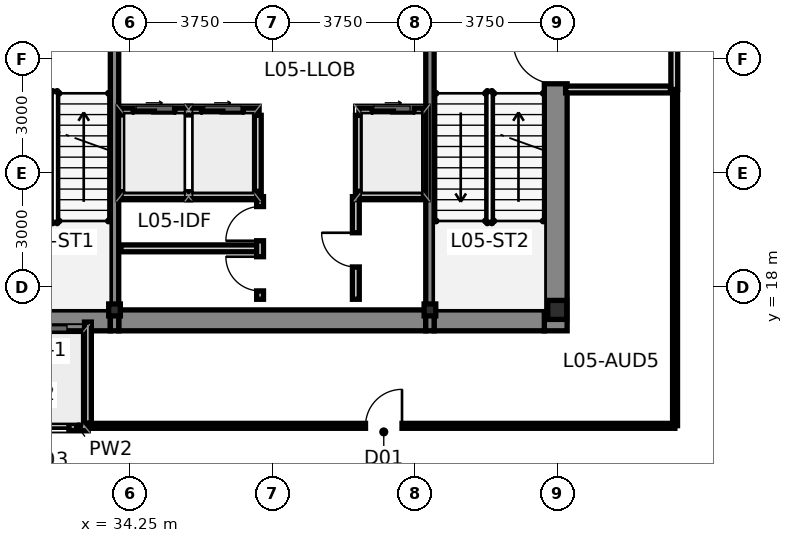
"""IFC4 building model, lengths in metres.
Left out: names, types, materials, properties, quantities, classifications, styles, units other than length and angle.
Written with IfcOpenShell. Run it as: python <this file> out.ifc"""

import sys

from ifc_helpers import new_model, si_unit, direction, frame, frame_2d, origin, origin_2d, place, context, subcontext, project, spatial, rectangle, i_section, extrude, source, transform, mapped, element, fill, save


model = new_model("IFC4")
c1 = context("Model", 3, precision=1e-05, world=origin(), true_north=direction((0.0, 1.0)))
c2 = subcontext(c1, "Body", "Model", "MODEL_VIEW")
j1 = project(units=[si_unit("LENGTHUNIT", "METRE"), si_unit("PLANEANGLEUNIT", "RADIAN")], contexts=[c1])
p1 = place(None, origin())
s1 = spatial("IfcSite", under=j1, at=p1, CompositionType="ELEMENT")
p2 = place(p1, origin())
s2 = spatial("IfcBuilding", under=s1, at=p2, CompositionType="ELEMENT")
p3 = place(p2, frame((0.0, 0.0, 23.1)))
s3 = spatial("IfcBuildingStorey", under=s2, at=p3, CompositionType="ELEMENT", Elevation=23.1)
m1 = source(origin(), c2, "Body", "SweptSolid", [
    extrude(i_section(OverallWidth=0.5, OverallDepth=0.5, WebThickness=0.028, FlangeThickness=0.04, at=origin_2d()), origin(), (0.0, 0.0, 1.0), 4.5),
])
p4 = place(p3, frame((45.5, 17.4, 0.0), z_axis=(0.0, 0.0, 1.0), x_axis=(1.0, 0.0, 0.0)))
e1 = element("IfcColumn", 1, at=p4, inside=s3, PredefinedType="COLUMN", context=c2, shape_type="MappedRepresentation", body=[
    mapped(m1, transform((0.0, 0.0, 0.0), scale=1.0)),
])
m2 = source(origin(), c2, "Body", "SweptSolid", [
    extrude(i_section(OverallWidth=0.307, OverallDepth=0.315, WebThickness=0.012, FlangeThickness=0.019, at=origin_2d()), origin(), (0.0, 0.0, 1.0), 4.5),
])
for number, where, z_axis, x_axis in (
    (2, (33.85, 17.4, 0.0), (0.0, 0.0, 1.0), (1.0, 0.0, 0.0)),
    (3, (42.15, 17.4, 0.0), (0.0, 0.0, 1.0), (1.0, 0.0, 0.0)),
):
    element("IfcColumn", number, at=place(p3, frame(where, z_axis=z_axis, x_axis=x_axis)), inside=s3, PredefinedType="COLUMN", context=c2, shape_type="MappedRepresentation", body=[
        mapped(m2, transform((0.0, 0.0, 0.0), scale=1.0)),
    ])
p5 = place(p3, frame((45.46, 16.85, 0.0), z_axis=(0.0, 0.0, 1.0), x_axis=(0.0, 1.0, 0.0)))
e4 = element("IfcWall", 4, at=p5, inside=s3, PredefinedType="SHEAR", context=c2, shape_type="SweptSolid", body=[
    extrude(rectangle(XDim=13.425, YDim=0.6, at=frame_2d((6.712, 0.0))), origin(), (0.0, 0.0, 1.0), 4.5),
])
p6 = place(p5, frame((6.5, 0.0, 0.0)))
e5 = element("IfcOpeningElement", 5, at=p6, cuts=e4, PredefinedType="OPENING", context=c2, shape_type="SweptSolid", body=[
    extrude(rectangle(XDim=1.12, YDim=2.15, at=frame_2d((0.56, 1.075))), frame((0.0, 0.312, 0.0), z_axis=(0.0, -1.0, 0.0), x_axis=(1.0, 0.0, 0.0)), (0.0, 0.0, 1.0), 0.624),
])
p7 = place(p5, frame((10.95, 0.0, 0.0)))
e6 = element("IfcOpeningElement", 6, at=p7, cuts=e4, PredefinedType="OPENING", context=c2, shape_type="SweptSolid", body=[
    extrude(rectangle(XDim=1.2, YDim=2.2, at=frame_2d((0.6, 1.1))), frame((0.0, 0.312, 0.0), z_axis=(0.0, -1.0, 0.0), x_axis=(1.0, 0.0, 0.0)), (0.0, 0.0, 1.0), 0.624),
])
p8 = place(p3, frame((30.84, 17.125, 0.0), z_axis=(0.0, 0.0, 1.0), x_axis=(1.0, 0.0, 0.0)))
e7 = element("IfcWall", 7, at=p8, inside=s3, PredefinedType="SHEAR", context=c2, shape_type="SweptSolid", body=[
    extrude(rectangle(XDim=2.9, YDim=0.55, at=frame_2d((1.45, 0.0))), origin(), (0.0, 0.0, 1.0), 4.5),
])
p9 = place(p3, frame((33.96, 17.125, 0.0), z_axis=(0.0, 0.0, 1.0), x_axis=(1.0, 0.0, 0.0)))
e8 = element("IfcWall", 8, at=p9, inside=s3, PredefinedType="SHEAR", context=c2, shape_type="SweptSolid", body=[
    extrude(rectangle(XDim=8.08, YDim=0.55, at=frame_2d((4.04, 0.0))), origin(), (0.0, 0.0, 1.0), 4.5),
])
p10 = place(p3, frame((42.26, 17.125, 0.0), z_axis=(0.0, 0.0, 1.0), x_axis=(1.0, 0.0, 0.0)))
e9 = element("IfcWall", 9, at=p10, inside=s3, PredefinedType="SHEAR", context=c2, shape_type="SweptSolid", body=[
    extrude(rectangle(XDim=2.9, YDim=0.55, at=frame_2d((1.45, 0.0))), origin(), (0.0, 0.0, 1.0), 4.5),
])
for number, where, z_axis, x_axis in (
    (10, (33.85, 16.85, 0.0), (0.0, 0.0, 1.0), (0.0, 1.0, 0.0)),
    (11, (42.15, 16.85, 0.0), (0.0, 0.0, 1.0), (0.0, 1.0, 0.0)),
):
    element("IfcWall", number, at=place(p3, frame(where, z_axis=z_axis, x_axis=x_axis)), inside=s3, PredefinedType="SHEAR", context=c2, shape_type="SweptSolid", body=[
        extrude(rectangle(XDim=13.425, YDim=0.22, at=frame_2d((6.712, 0.0))), origin(), (0.0, 0.0, 1.0), 4.5),
    ])
p11 = place(p3, frame((30.85, 14.32, 0.0), z_axis=(0.0, 0.0, 1.0), x_axis=(1.0, 0.0, 0.0)))
e12 = element("IfcWall", 12, at=p11, inside=s3, PredefinedType="PARTITIONING", context=c2, shape_type="SweptSolid", body=[
    extrude(rectangle(XDim=2.3, YDim=0.18, at=frame_2d((1.15, 0.0))), origin(), (0.0, 0.0, 1.0), 4.25),
])
p12 = place(p11, frame((0.45, 0.0, 0.0)))
e13 = element("IfcOpeningElement", 13, at=p12, cuts=e12, PredefinedType="OPENING", context=c2, shape_type="SweptSolid", body=[
    extrude(rectangle(XDim=1.35, YDim=2.25, at=frame_2d((0.675, 1.125))), frame((0.0, 0.102, 0.0), z_axis=(0.0, -1.0, 0.0), x_axis=(1.0, 0.0, 0.0)), (0.0, 0.0, 1.0), 0.204),
])
p13 = place(p3, frame((33.15, 14.42, 0.0), z_axis=(0.0, 0.0, 1.0), x_axis=(0.0, 1.0, 0.0)))
e14 = element("IfcWall", 14, at=p13, inside=s3, PredefinedType="PARTITIONING", context=c2, shape_type="SweptSolid", body=[
    extrude(rectangle(XDim=2.66, YDim=0.18, at=frame_2d((1.33, 0.0))), origin(), (0.0, 0.0, 1.0), 4.25),
])
p14 = place(p3, frame((34.02, 22.62, 0.0), z_axis=(0.0, 0.0, 1.0), x_axis=(1.0, 0.0, 0.0)))
e15 = element("IfcWall", 15, at=p14, inside=s3, PredefinedType="PARTITIONING", context=c2, shape_type="SweptSolid", body=[
    extrude(rectangle(XDim=3.6, YDim=0.18, at=frame_2d((1.8, 0.0))), origin(), (0.0, 0.0, 1.0), 4.25),
])
p15 = place(p14, frame((0.32, 0.0, 0.0)))
e16 = element("IfcOpeningElement", 16, at=p15, cuts=e15, PredefinedType="OPENING", context=c2, shape_type="SweptSolid", body=[
    extrude(rectangle(XDim=1.1, YDim=2.2, at=frame_2d((0.55, 1.1))), frame((0.0, 0.102, 0.0), z_axis=(0.0, -1.0, 0.0), x_axis=(1.0, 0.0, 0.0)), (0.0, 0.0, 1.0), 0.204),
])
p16 = place(p14, frame((2.12, 0.0, 0.0)))
e17 = element("IfcOpeningElement", 17, at=p16, cuts=e15, PredefinedType="OPENING", context=c2, shape_type="SweptSolid", body=[
    extrude(rectangle(XDim=1.1, YDim=2.2, at=frame_2d((0.55, 1.1))), frame((0.0, 0.102, 0.0), z_axis=(0.0, -1.0, 0.0), x_axis=(1.0, 0.0, 0.0)), (0.0, 0.0, 1.0), 0.204),
])
p17 = place(p3, frame((40.28, 22.62, 0.0), z_axis=(0.0, 0.0, 1.0), x_axis=(1.0, 0.0, 0.0)))
e18 = element("IfcWall", 18, at=p17, inside=s3, PredefinedType="PARTITIONING", context=c2, shape_type="SweptSolid", body=[
    extrude(rectangle(XDim=1.7, YDim=0.18, at=frame_2d((0.85, 0.0))), origin(), (0.0, 0.0, 1.0), 4.25),
])
p18 = place(p17, frame((0.35, 0.0, 0.0)))
e19 = element("IfcOpeningElement", 19, at=p18, cuts=e18, PredefinedType="OPENING", context=c2, shape_type="SweptSolid", body=[
    extrude(rectangle(XDim=1.1, YDim=2.2, at=frame_2d((0.55, 1.1))), frame((0.0, 0.102, 0.0), z_axis=(0.0, -1.0, 0.0), x_axis=(1.0, 0.0, 0.0)), (0.0, 0.0, 1.0), 0.204),
])
for number, where, z_axis, x_axis in (
    (20, (37.62, 20.52, 0.0), (0.0, 0.0, 1.0), (0.0, 1.0, 0.0)),
    (21, (40.28, 20.52, 0.0), (0.0, 0.0, 1.0), (0.0, 1.0, 0.0)),
):
    element("IfcWall", number, at=place(p3, frame(where, z_axis=z_axis, x_axis=x_axis)), inside=s3, PredefinedType="PARTITIONING", context=c2, shape_type="SweptSolid", body=[
        extrude(rectangle(XDim=2.0, YDim=0.18, at=frame_2d((1.0, 0.0))), origin(), (0.0, 0.0, 1.0), 4.25),
    ])
p19 = place(p3, frame((48.58, 23.2, 0.0), z_axis=(0.0, 0.0, 1.0), x_axis=(0.0, 1.0, 0.0)))
e22 = element("IfcWall", 22, at=p19, inside=s3, PredefinedType="PARTITIONING", context=c2, shape_type="SweptSolid", body=[
    extrude(rectangle(XDim=6.4, YDim=0.18, at=frame_2d((3.2, 0.0))), origin(), (0.0, 0.0, 1.0), 4.25),
])
p20 = place(p19, frame((2.65, 0.0, 0.0)))
e23 = element("IfcOpeningElement", 23, at=p20, cuts=e22, PredefinedType="OPENING", context=c2, shape_type="SweptSolid", body=[
    extrude(rectangle(XDim=1.05, YDim=2.15, at=frame_2d((0.525, 1.075))), frame((0.0, 0.102, 0.0), z_axis=(0.0, -1.0, 0.0), x_axis=(1.0, 0.0, 0.0)), (0.0, 0.0, 1.0), 0.204),
])
p21 = place(p3, frame((45.72, 23.2, 0.0), z_axis=(0.0, 0.0, 1.0), x_axis=(1.0, 0.0, 0.0)))
e24 = element("IfcWall", 24, at=p21, inside=s3, PredefinedType="PARTITIONING", context=c2, shape_type="SweptSolid", body=[
    extrude(rectangle(XDim=2.76, YDim=0.18, at=frame_2d((1.38, 0.0))), origin(), (0.0, 0.0, 1.0), 4.25),
])
p22 = place(p3, frame((34.02, 20.42, 0.0), z_axis=(0.0, 0.0, 1.0), x_axis=(1.0, 0.0, 0.0)))
e25 = element("IfcWall", 25, at=p22, inside=s3, PredefinedType="PARTITIONING", context=c2, shape_type="SweptSolid", body=[
    extrude(rectangle(XDim=3.64, YDim=0.18, at=frame_2d((1.82, 0.0))), origin(), (0.0, 0.0, 1.0), 4.25),
])
p23 = place(p3, frame((40.22, 20.42, 0.0), z_axis=(0.0, 0.0, 1.0), x_axis=(1.0, 0.0, 0.0)))
e26 = element("IfcWall", 26, at=p23, inside=s3, PredefinedType="PARTITIONING", context=c2, shape_type="SweptSolid", body=[
    extrude(rectangle(XDim=1.76, YDim=0.18, at=frame_2d((0.88, 0.0))), origin(), (0.0, 0.0, 1.0), 4.25),
])
p24 = place(p3, frame((34.02, 19.02, 0.0), z_axis=(0.0, 0.0, 1.0), x_axis=(1.0, 0.0, 0.0)))
e27 = element("IfcWall", 27, at=p24, inside=s3, PredefinedType="PARTITIONING", context=c2, shape_type="SweptSolid", body=[
    extrude(rectangle(XDim=3.58, YDim=0.18, at=frame_2d((1.79, 0.0))), origin(), (0.0, 0.0, 1.0), 4.25),
])
p25 = place(p3, frame((37.68, 17.68, 0.0), z_axis=(0.0, 0.0, 1.0), x_axis=(0.0, 1.0, 0.0)))
e28 = element("IfcWall", 28, at=p25, inside=s3, PredefinedType="PARTITIONING", context=c2, shape_type="SweptSolid", body=[
    extrude(rectangle(XDim=2.7, YDim=0.18, at=frame_2d((1.35, 0.0))), origin(), (0.0, 0.0, 1.0), 4.25),
])
p26 = place(p25, frame((0.22, 0.0, 0.0)))
e29 = element("IfcOpeningElement", 29, at=p26, cuts=e28, PredefinedType="OPENING", context=c2, shape_type="SweptSolid", body=[
    extrude(rectangle(XDim=0.9, YDim=2.1, at=frame_2d((0.45, 1.05))), frame((0.0, 0.102, 0.0), z_axis=(0.0, -1.0, 0.0), x_axis=(1.0, 0.0, 0.0)), (0.0, 0.0, 1.0), 0.204),
])
p27 = place(p25, frame((1.54, 0.0, 0.0)))
e30 = element("IfcOpeningElement", 30, at=p27, cuts=e28, PredefinedType="OPENING", context=c2, shape_type="SweptSolid", body=[
    extrude(rectangle(XDim=0.9, YDim=2.1, at=frame_2d((0.45, 1.05))), frame((0.0, 0.102, 0.0), z_axis=(0.0, -1.0, 0.0), x_axis=(1.0, 0.0, 0.0)), (0.0, 0.0, 1.0), 0.204),
])
p28 = place(p3, frame((40.2, 17.68, 0.0), z_axis=(0.0, 0.0, 1.0), x_axis=(0.0, 1.0, 0.0)))
e31 = element("IfcWall", 31, at=p28, inside=s3, PredefinedType="PARTITIONING", context=c2, shape_type="SweptSolid", body=[
    extrude(rectangle(XDim=2.7, YDim=0.18, at=frame_2d((1.35, 0.0))), origin(), (0.0, 0.0, 1.0), 4.25),
])
p29 = place(p28, frame((0.85, 0.0, 0.0)))
e32 = element("IfcOpeningElement", 32, at=p29, cuts=e31, PredefinedType="OPENING", context=c2, shape_type="SweptSolid", body=[
    extrude(rectangle(XDim=0.9, YDim=2.1, at=frame_2d((0.45, 1.05))), frame((0.0, 0.102, 0.0), z_axis=(0.0, -1.0, 0.0), x_axis=(1.0, 0.0, 0.0)), (0.0, 0.0, 1.0), 0.204),
])
p30 = place(p3, frame((33.275, 14.35, 0.0), z_axis=(0.0, 0.0, 1.0), x_axis=(1.0, 0.0, 0.0)))
e33 = element("IfcWall", 33, at=p30, inside=s3, PredefinedType="PARTITIONING", context=c2, shape_type="SweptSolid", body=[
    extrude(rectangle(XDim=15.32, YDim=0.13, at=frame_2d((7.66, 0.0))), origin(), (0.0, 0.0, 1.0), 4.25),
])
p31 = place(p30, frame((7.18, 0.0, 0.0)))
e34 = element("IfcOpeningElement", 34, at=p31, cuts=e33, PredefinedType="OPENING", context=c2, shape_type="SweptSolid", body=[
    extrude(rectangle(XDim=0.96, YDim=2.15, at=frame_2d((0.48, 1.075))), frame((0.0, 0.077, 0.0), z_axis=(0.0, -1.0, 0.0), x_axis=(1.0, 0.0, 0.0)), (0.0, 0.0, 1.0), 0.154),
])
p32 = place(p3, frame((48.6, 14.355, 0.0), z_axis=(0.0, 0.0, 1.0), x_axis=(0.0, 1.0, 0.0)))
e35 = element("IfcWall", 35, at=p32, inside=s3, PredefinedType="PARTITIONING", context=c2, shape_type="SweptSolid", body=[
    extrude(rectangle(XDim=8.75, YDim=0.13, at=frame_2d((4.375, 0.0))), origin(), (0.0, 0.0, 1.0), 4.25),
])
p33 = place(p6, origin())
e36 = element("IfcDoor", 36, at=p33, inside=s3, OperationType="SINGLE_SWING_RIGHT", PredefinedType="DOOR", context=c2, shape_type="SweptSolid", body=[
    extrude(rectangle(XDim=1.12, YDim=2.15, at=frame_2d((0.56, 1.075))), frame((0.0, 0.025, 0.0), z_axis=(0.0, -1.0, 0.0), x_axis=(1.0, 0.0, 0.0)), (0.0, 0.0, 1.0), 0.05),
])
fill(e5, e36)
p34 = place(p12, origin())
e37 = element("IfcDoor", 37, at=p34, inside=s3, OperationType="SLIDING_TO_LEFT", PredefinedType="DOOR", context=c2, shape_type="SweptSolid", body=[
    extrude(rectangle(XDim=1.35, YDim=2.25, at=frame_2d((0.675, 1.125))), frame((0.0, 0.025, 0.0), z_axis=(0.0, -1.0, 0.0), x_axis=(1.0, 0.0, 0.0)), (0.0, 0.0, 1.0), 0.05),
])
fill(e13, e37)
p35 = place(p15, origin())
e38 = element("IfcDoor", 38, at=p35, inside=s3, OperationType="SLIDING_TO_LEFT", PredefinedType="DOOR", context=c2, shape_type="SweptSolid", body=[
    extrude(rectangle(XDim=1.1, YDim=2.2, at=frame_2d((0.55, 1.1))), frame((0.0, 0.025, 0.0), z_axis=(0.0, -1.0, 0.0), x_axis=(1.0, 0.0, 0.0)), (0.0, 0.0, 1.0), 0.05),
])
fill(e16, e38)
p36 = place(p16, origin())
e39 = element("IfcDoor", 39, at=p36, inside=s3, OperationType="SLIDING_TO_RIGHT", PredefinedType="DOOR", context=c2, shape_type="SweptSolid", body=[
    extrude(rectangle(XDim=1.1, YDim=2.2, at=frame_2d((0.55, 1.1))), frame((0.0, 0.025, 0.0), z_axis=(0.0, -1.0, 0.0), x_axis=(1.0, 0.0, 0.0)), (0.0, 0.0, 1.0), 0.05),
])
fill(e17, e39)
p37 = place(p18, origin())
e40 = element("IfcDoor", 40, at=p37, inside=s3, OperationType="SLIDING_TO_LEFT", PredefinedType="DOOR", context=c2, shape_type="SweptSolid", body=[
    extrude(rectangle(XDim=1.1, YDim=2.2, at=frame_2d((0.55, 1.1))), frame((0.0, 0.025, 0.0), z_axis=(0.0, -1.0, 0.0), x_axis=(1.0, 0.0, 0.0)), (0.0, 0.0, 1.0), 0.05),
])
fill(e19, e40)
p38 = place(p26, origin())
e41 = element("IfcDoor", 41, at=p38, inside=s3, OperationType="SINGLE_SWING_RIGHT", PredefinedType="DOOR", context=c2, shape_type="SweptSolid", body=[
    extrude(rectangle(XDim=0.9, YDim=2.1, at=frame_2d((0.45, 1.05))), frame((0.0, 0.025, 0.0), z_axis=(0.0, -1.0, 0.0), x_axis=(1.0, 0.0, 0.0)), (0.0, 0.0, 1.0), 0.05),
])
fill(e29, e41)
p39 = place(p27, origin())
e42 = element("IfcDoor", 42, at=p39, inside=s3, OperationType="SINGLE_SWING_LEFT", PredefinedType="DOOR", context=c2, shape_type="SweptSolid", body=[
    extrude(rectangle(XDim=0.9, YDim=2.1, at=frame_2d((0.45, 1.05))), frame((0.0, 0.025, 0.0), z_axis=(0.0, -1.0, 0.0), x_axis=(1.0, 0.0, 0.0)), (0.0, 0.0, 1.0), 0.05),
])
fill(e30, e42)
p40 = place(p29, origin())
e43 = element("IfcDoor", 43, at=p40, inside=s3, OperationType="SINGLE_SWING_RIGHT", PredefinedType="DOOR", context=c2, shape_type="SweptSolid", body=[
    extrude(rectangle(XDim=0.9, YDim=2.1, at=frame_2d((0.45, 1.05))), frame((0.0, 0.025, 0.0), z_axis=(0.0, -1.0, 0.0), x_axis=(1.0, 0.0, 0.0)), (0.0, 0.0, 1.0), 0.05),
])
fill(e32, e43)
p41 = place(p31, origin())
e44 = element("IfcDoor", 44, at=p41, inside=s3, OperationType="SINGLE_SWING_RIGHT", PredefinedType="DOOR", context=c2, shape_type="SweptSolid", body=[
    extrude(rectangle(XDim=0.96, YDim=2.15, at=frame_2d((0.48, 1.075))), frame((0.0, 0.025, 0.0), z_axis=(0.0, -1.0, 0.0), x_axis=(1.0, 0.0, 0.0)), (0.0, 0.0, 1.0), 0.05),
])
fill(e34, e44)
save(model, sys.argv[1])
